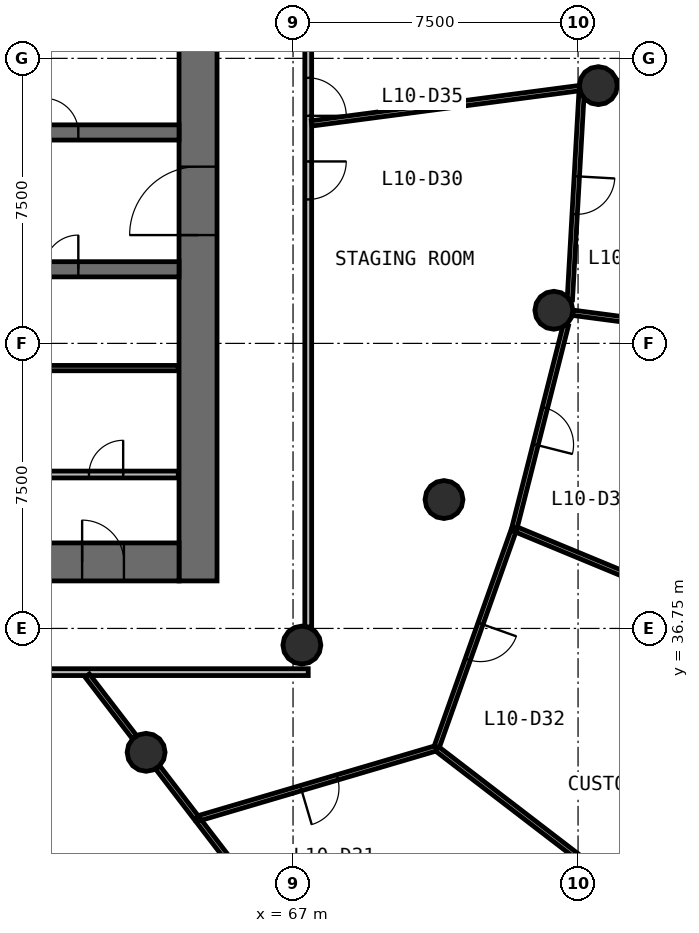
"""IFC4 building model, lengths in metres.
Left out: names, types, materials, properties, quantities, classifications, styles, units other than length and angle.
Written with IfcOpenShell. Run it as: python <this file> out.ifc"""

import sys

from ifc_helpers import new_model, si_unit, direction, frame, frame_2d, origin, origin_2d, place, context, subcontext, project, spatial, rectangle, circle, extrude, source, transform, mapped, element, fill, save


model = new_model("IFC4")
c1 = context("Model", 3, precision=1e-05, world=origin(), true_north=direction((0.0, 1.0)))
c2 = subcontext(c1, "Body", "Model", "MODEL_VIEW")
j1 = project(units=[si_unit("LENGTHUNIT", "METRE"), si_unit("PLANEANGLEUNIT", "RADIAN")], contexts=[c1])
p1 = place(None, origin())
s1 = spatial("IfcSite", under=j1, at=p1, CompositionType="ELEMENT")
p2 = place(p1, origin())
s2 = spatial("IfcBuilding", under=s1, at=p2, CompositionType="ELEMENT")
p3 = place(p2, frame((0.0, 0.0, 44.6)))
s3 = spatial("IfcBuildingStorey", under=s2, at=p3, CompositionType="ELEMENT", Elevation=44.6)
p4 = place(p3, frame((64.5, 38.0, 0.0), z_axis=(0.0, 0.0, 1.0), x_axis=(0.0, 1.0, 0.0)))
e1 = element("IfcWall", 1, at=p4, inside=s3, PredefinedType="SHEAR", context=c2, shape_type="SweptSolid", body=[
    extrude(rectangle(XDim=20.0, YDim=1.0, at=frame_2d((10.0, 0.0))), origin(), (0.0, 0.0, 1.0), 4.4),
])
p5 = place(p4, frame((9.1, 0.0, 0.0)))
e2 = element("IfcOpeningElement", 2, at=p5, cuts=e1, PredefinedType="OPENING", context=c2, shape_type="SweptSolid", body=[
    extrude(rectangle(XDim=1.8, YDim=2.1, at=frame_2d((0.9, 1.05))), frame((0.0, 0.51, 0.0), z_axis=(0.0, -1.0, 0.0), x_axis=(1.0, 0.0, 0.0)), (0.0, 0.0, 1.0), 1.02),
])
p6 = place(p3, frame((40.0, 38.5, 0.0), z_axis=(0.0, 0.0, 1.0), x_axis=(1.0, 0.0, 0.0)))
e3 = element("IfcWall", 3, at=p6, inside=s3, PredefinedType="SHEAR", context=c2, shape_type="SweptSolid", body=[
    extrude(rectangle(XDim=24.0, YDim=1.0, at=frame_2d((12.0, 0.0))), origin(), (0.0, 0.0, 1.0), 4.4),
])
p7 = place(p6, frame((21.45, 0.0, 0.0)))
e4 = element("IfcOpeningElement", 4, at=p7, cuts=e3, PredefinedType="OPENING", context=c2, shape_type="SweptSolid", body=[
    extrude(rectangle(XDim=1.1, YDim=2.1, at=frame_2d((0.55, 1.05))), frame((0.0, 0.51, 0.0), z_axis=(0.0, -1.0, 0.0), x_axis=(1.0, 0.0, 0.0)), (0.0, 0.0, 1.0), 1.02),
])
p8 = place(p6, frame((1.95, 0.0, 0.0)))
e5 = element("IfcOpeningElement", 5, at=p8, cuts=e3, PredefinedType="OPENING", context=c2, shape_type="SweptSolid", body=[
    extrude(rectangle(XDim=1.1, YDim=2.1, at=frame_2d((0.55, 1.05))), frame((0.0, 0.51, 0.0), z_axis=(0.0, -1.0, 0.0), x_axis=(1.0, 0.0, 0.0)), (0.0, 0.0, 1.0), 1.02),
])
p9 = place(p3, frame((40.0, 49.8, 0.0), z_axis=(0.0, 0.0, 1.0), x_axis=(1.0, 0.0, 0.0)))
e6 = element("IfcWall", 6, at=p9, inside=s3, PredefinedType="SHEAR", context=c2, shape_type="SweptSolid", body=[
    extrude(rectangle(XDim=24.0, YDim=0.4, at=frame_2d((12.0, 0.0))), origin(), (0.0, 0.0, 1.0), 4.4),
])
p10 = place(p9, frame((4.5, 0.0, 0.0)))
e7 = element("IfcOpeningElement", 7, at=p10, cuts=e6, PredefinedType="OPENING", context=c2, shape_type="SweptSolid", body=[
    extrude(rectangle(XDim=1.1, YDim=2.1, at=frame_2d((0.55, 1.05))), frame((0.0, 0.21, 0.0), z_axis=(0.0, -1.0, 0.0), x_axis=(1.0, 0.0, 0.0)), (0.0, 0.0, 1.0), 0.42),
])
p11 = place(p9, frame((7.0, 0.0, 0.0)))
e8 = element("IfcOpeningElement", 8, at=p11, cuts=e6, PredefinedType="OPENING", context=c2, shape_type="SweptSolid", body=[
    extrude(rectangle(XDim=1.1, YDim=2.1, at=frame_2d((0.55, 1.05))), frame((0.0, 0.21, 0.0), z_axis=(0.0, -1.0, 0.0), x_axis=(1.0, 0.0, 0.0)), (0.0, 0.0, 1.0), 0.42),
])
p12 = place(p9, frame((9.5, 0.0, 0.0)))
e9 = element("IfcOpeningElement", 9, at=p12, cuts=e6, PredefinedType="OPENING", context=c2, shape_type="SweptSolid", body=[
    extrude(rectangle(XDim=1.1, YDim=2.1, at=frame_2d((0.55, 1.05))), frame((0.0, 0.21, 0.0), z_axis=(0.0, -1.0, 0.0), x_axis=(1.0, 0.0, 0.0)), (0.0, 0.0, 1.0), 0.42),
])
p13 = place(p9, frame((0.9, 0.0, 0.0)))
e10 = element("IfcOpeningElement", 10, at=p13, cuts=e6, PredefinedType="OPENING", context=c2, shape_type="SweptSolid", body=[
    extrude(rectangle(XDim=1.8, YDim=2.4, at=frame_2d((0.9, 1.2))), frame((0.0, 0.21, 0.0), z_axis=(0.0, -1.0, 0.0), x_axis=(1.0, 0.0, 0.0)), (0.0, 0.0, 1.0), 0.42),
])
p14 = place(p9, frame((20.45, 0.0, 0.0)))
e11 = element("IfcOpeningElement", 11, at=p14, cuts=e6, PredefinedType="OPENING", context=c2, shape_type="SweptSolid", body=[
    extrude(rectangle(XDim=0.9, YDim=2.1, at=frame_2d((0.45, 1.05))), frame((0.0, 0.21, 0.0), z_axis=(0.0, -1.0, 0.0), x_axis=(1.0, 0.0, 0.0)), (0.0, 0.0, 1.0), 0.42),
])
p15 = place(p9, frame((11.65, 0.0, 0.0)))
e12 = element("IfcOpeningElement", 12, at=p15, cuts=e6, PredefinedType="OPENING", context=c2, shape_type="SweptSolid", body=[
    extrude(rectangle(XDim=0.9, YDim=2.1, at=frame_2d((0.45, 1.05))), frame((0.0, 0.21, 0.0), z_axis=(0.0, -1.0, 0.0), x_axis=(1.0, 0.0, 0.0)), (0.0, 0.0, 1.0), 0.42),
])
p16 = place(p3, frame((40.0, 46.2, 0.0), z_axis=(0.0, 0.0, 1.0), x_axis=(1.0, 0.0, 0.0)))
e13 = element("IfcWall", 13, at=p16, inside=s3, PredefinedType="SHEAR", context=c2, shape_type="SweptSolid", body=[
    extrude(rectangle(XDim=24.0, YDim=0.4, at=frame_2d((12.0, 0.0))), origin(), (0.0, 0.0, 1.0), 4.4),
])
p17 = place(p16, frame((4.5, 0.0, 0.0)))
e14 = element("IfcOpeningElement", 14, at=p17, cuts=e13, PredefinedType="OPENING", context=c2, shape_type="SweptSolid", body=[
    extrude(rectangle(XDim=1.1, YDim=2.1, at=frame_2d((0.55, 1.05))), frame((0.0, 0.21, 0.0), z_axis=(0.0, -1.0, 0.0), x_axis=(1.0, 0.0, 0.0)), (0.0, 0.0, 1.0), 0.42),
])
p18 = place(p16, frame((7.0, 0.0, 0.0)))
e15 = element("IfcOpeningElement", 15, at=p18, cuts=e13, PredefinedType="OPENING", context=c2, shape_type="SweptSolid", body=[
    extrude(rectangle(XDim=1.1, YDim=2.1, at=frame_2d((0.55, 1.05))), frame((0.0, 0.21, 0.0), z_axis=(0.0, -1.0, 0.0), x_axis=(1.0, 0.0, 0.0)), (0.0, 0.0, 1.0), 0.42),
])
p19 = place(p16, frame((9.5, 0.0, 0.0)))
e16 = element("IfcOpeningElement", 16, at=p19, cuts=e13, PredefinedType="OPENING", context=c2, shape_type="SweptSolid", body=[
    extrude(rectangle(XDim=1.1, YDim=2.1, at=frame_2d((0.55, 1.05))), frame((0.0, 0.21, 0.0), z_axis=(0.0, -1.0, 0.0), x_axis=(1.0, 0.0, 0.0)), (0.0, 0.0, 1.0), 0.42),
])
p20 = place(p16, frame((20.45, 0.0, 0.0)))
e17 = element("IfcOpeningElement", 17, at=p20, cuts=e13, PredefinedType="OPENING", context=c2, shape_type="SweptSolid", body=[
    extrude(rectangle(XDim=0.9, YDim=2.1, at=frame_2d((0.45, 1.05))), frame((0.0, 0.21, 0.0), z_axis=(0.0, -1.0, 0.0), x_axis=(1.0, 0.0, 0.0)), (0.0, 0.0, 1.0), 0.42),
])
p21 = place(p16, frame((2.65, 0.0, 0.0)))
e18 = element("IfcOpeningElement", 18, at=p21, cuts=e13, PredefinedType="OPENING", context=c2, shape_type="SweptSolid", body=[
    extrude(rectangle(XDim=0.9, YDim=2.1, at=frame_2d((0.45, 1.05))), frame((0.0, 0.21, 0.0), z_axis=(0.0, -1.0, 0.0), x_axis=(1.0, 0.0, 0.0)), (0.0, 0.0, 1.0), 0.42),
])
p22 = place(p16, frame((11.65, 0.0, 0.0)))
e19 = element("IfcOpeningElement", 19, at=p22, cuts=e13, PredefinedType="OPENING", context=c2, shape_type="SweptSolid", body=[
    extrude(rectangle(XDim=0.9, YDim=2.1, at=frame_2d((0.45, 1.05))), frame((0.0, 0.21, 0.0), z_axis=(0.0, -1.0, 0.0), x_axis=(1.0, 0.0, 0.0)), (0.0, 0.0, 1.0), 0.42),
])
m1 = source(origin(), c2, "Body", "SweptSolid", [
    extrude(circle(Radius=0.5, at=origin_2d()), origin(), (0.0, 0.0, 1.0), 4.4),
])
for number, where, z_axis, x_axis in (
    (20, (75.034, 51.032, 0.0), (0.0, 0.0, 1.0), (1.0, 0.0, 0.0)),
    (21, (63.134, 33.49, 0.0), (0.0, 0.0, 1.0), (1.0, 0.0, 0.0)),
    (22, (67.232, 36.312, 0.0), (0.0, 0.0, 1.0), (1.0, 0.0, 0.0)),
    (23, (70.972, 40.141, 0.0), (0.0, 0.0, 1.0), (1.0, 0.0, 0.0)),
    (24, (73.863, 45.122, 0.0), (0.0, 0.0, 1.0), (1.0, 0.0, 0.0)),
):
    element("IfcColumn", number, at=place(p3, frame(where, z_axis=z_axis, x_axis=x_axis)), inside=s3, PredefinedType="COLUMN", context=c2, shape_type="MappedRepresentation", body=[
        mapped(m1, transform((0.0, 0.0, 0.0), scale=1.0)),
    ])
p23 = place(p3, frame((67.4, 35.6, 0.0), z_axis=(0.0, 0.0, 1.0), x_axis=(-1.0, 0.0, 0.0)))
e25 = element("IfcWall", 25, at=p23, inside=s3, PredefinedType="PARTITIONING", context=c2, shape_type="SweptSolid", body=[
    extrude(rectangle(XDim=30.8, YDim=0.18, at=frame_2d((15.4, 0.0))), origin(), (0.0, 0.0, 1.0), 3.05),
])
p24 = place(p23, frame((27.45, 0.0, 0.0)))
e26 = element("IfcOpeningElement", 26, at=p24, cuts=e25, PredefinedType="OPENING", context=c2, shape_type="SweptSolid", body=[
    extrude(rectangle(XDim=0.9, YDim=2.1, at=frame_2d((0.45, 1.05))), frame((0.0, 0.1, 0.0), z_axis=(0.0, -1.0, 0.0), x_axis=(1.0, 0.0, 0.0)), (0.0, 0.0, 1.0), 0.2),
])
p25 = place(p23, frame((23.85, 0.0, 0.0)))
e27 = element("IfcOpeningElement", 27, at=p25, cuts=e25, PredefinedType="OPENING", context=c2, shape_type="SweptSolid", body=[
    extrude(rectangle(XDim=0.9, YDim=2.1, at=frame_2d((0.45, 1.05))), frame((0.0, 0.1, 0.0), z_axis=(0.0, -1.0, 0.0), x_axis=(1.0, 0.0, 0.0)), (0.0, 0.0, 1.0), 0.2),
])
p26 = place(p23, frame((20.85, 0.0, 0.0)))
e28 = element("IfcOpeningElement", 28, at=p26, cuts=e25, PredefinedType="OPENING", context=c2, shape_type="SweptSolid", body=[
    extrude(rectangle(XDim=0.9, YDim=2.1, at=frame_2d((0.45, 1.05))), frame((0.0, 0.1, 0.0), z_axis=(0.0, -1.0, 0.0), x_axis=(1.0, 0.0, 0.0)), (0.0, 0.0, 1.0), 0.2),
])
p27 = place(p23, frame((14.95, 0.0, 0.0)))
e29 = element("IfcOpeningElement", 29, at=p27, cuts=e25, PredefinedType="OPENING", context=c2, shape_type="SweptSolid", body=[
    extrude(rectangle(XDim=1.0, YDim=2.1, at=frame_2d((0.5, 1.05))), frame((0.0, 0.1, 0.0), z_axis=(0.0, -1.0, 0.0), x_axis=(1.0, 0.0, 0.0)), (0.0, 0.0, 1.0), 0.2),
])
p28 = place(p3, frame((67.4, 60.37, 0.0), z_axis=(0.0, 0.0, 1.0), x_axis=(0.0, -1.0, 0.0)))
e30 = element("IfcWall", 30, at=p28, inside=s3, PredefinedType="PARTITIONING", context=c2, shape_type="SweptSolid", body=[
    extrude(rectangle(XDim=23.583, YDim=0.18, at=frame_2d((11.791, 0.0))), origin(), (0.0, 0.0, 1.0), 3.05),
])
p29 = place(p28, frame((11.333, 0.0, 0.0)))
e31 = element("IfcOpeningElement", 31, at=p29, cuts=e30, PredefinedType="OPENING", context=c2, shape_type="SweptSolid", body=[
    extrude(rectangle(XDim=1.0, YDim=2.1, at=frame_2d((0.5, 1.05))), frame((0.0, 0.1, 0.0), z_axis=(0.0, -1.0, 0.0), x_axis=(1.0, 0.0, 0.0)), (0.0, 0.0, 1.0), 0.2),
])
p30 = place(p28, frame((9.133, 0.0, 0.0)))
e32 = element("IfcOpeningElement", 32, at=p30, cuts=e30, PredefinedType="OPENING", context=c2, shape_type="SweptSolid", body=[
    extrude(rectangle(XDim=1.0, YDim=2.1, at=frame_2d((0.5, 1.05))), frame((0.0, 0.1, 0.0), z_axis=(0.0, -1.0, 0.0), x_axis=(1.0, 0.0, 0.0)), (0.0, 0.0, 1.0), 0.2),
])
p31 = place(p3, frame((60.23, 40.8, 0.0), z_axis=(0.0, 0.0, 1.0), x_axis=(1.0, 0.0, 0.0)))
e33 = element("IfcWall", 33, at=p31, inside=s3, PredefinedType="PARTITIONING", context=c2, shape_type="SweptSolid", body=[
    extrude(rectangle(XDim=3.75, YDim=0.18, at=frame_2d((1.875, 0.0))), origin(), (0.0, 0.0, 1.0), 3.95),
])
p32 = place(p31, frame((1.4, 0.0, 0.0)))
e34 = element("IfcOpeningElement", 34, at=p32, cuts=e33, PredefinedType="OPENING", context=c2, shape_type="SweptSolid", body=[
    extrude(rectangle(XDim=0.9, YDim=2.1, at=frame_2d((0.45, 1.05))), frame((0.0, 0.1, 0.0), z_axis=(0.0, -1.0, 0.0), x_axis=(1.0, 0.0, 0.0)), (0.0, 0.0, 1.0), 0.2),
])
p33 = place(p3, frame((75.534, 51.098, 0.0), z_axis=(0.0, 0.0, 1.0), x_axis=(0.991446586451, 0.130513088287, 0.0)))
e35 = element("IfcWall", 35, at=p33, inside=s3, PredefinedType="PARTITIONING", context=c2, shape_type="SweptSolid", body=[
    extrude(rectangle(XDim=11.86, YDim=0.14, at=frame_2d((5.93, 0.0))), origin(), (0.0, 0.0, 1.0), 3.05),
])
p34 = place(p3, frame((74.363, 45.056, 0.0), z_axis=(0.0, 0.0, 1.0), x_axis=(0.991443306772, -0.130538000051, 0.0)))
e36 = element("IfcWall", 36, at=p34, inside=s3, PredefinedType="PARTITIONING", context=c2, shape_type="SweptSolid", body=[
    extrude(rectangle(XDim=11.195, YDim=0.14, at=frame_2d((5.598, 0.0))), origin(), (0.0, 0.0, 1.0), 3.05),
])
p35 = place(p3, frame((72.821, 39.375, 0.0), z_axis=(0.0, 0.0, 1.0), x_axis=(0.923875203153, -0.382693884193, 0.0)))
e37 = element("IfcWall", 37, at=p35, inside=s3, PredefinedType="PARTITIONING", context=c2, shape_type="SweptSolid", body=[
    extrude(rectangle(XDim=8.845, YDim=0.14, at=frame_2d((4.423, 0.0))), origin(), (0.0, 0.0, 1.0), 3.05),
])
p36 = place(p3, frame((67.49, 50.039, 0.0), z_axis=(0.0, 0.0, 1.0), x_axis=(0.99144622305, 0.130515848849, 0.0)))
e38 = element("IfcWall", 38, at=p36, inside=s3, PredefinedType="PARTITIONING", context=c2, shape_type="SweptSolid", body=[
    extrude(rectangle(XDim=7.104, YDim=0.14, at=frame_2d((3.552, 0.0))), origin(), (0.0, 0.0, 1.0), 3.05),
])
p37 = place(p3, frame((70.769, 33.598, 0.0), z_axis=(0.0, 0.0, 1.0), x_axis=(-0.959164410747, -0.282849134974, 0.0)))
e39 = element("IfcWall", 39, at=p37, inside=s3, PredefinedType="PARTITIONING", context=c2, shape_type="SweptSolid", body=[
    extrude(rectangle(XDim=6.562, YDim=0.14, at=frame_2d((3.281, 0.0))), origin(), (0.0, 0.0, 1.0), 3.05),
])
p38 = place(p37, frame((2.712, 0.0, 0.0)))
e40 = element("IfcOpeningElement", 40, at=p38, cuts=e39, PredefinedType="OPENING", context=c2, shape_type="SweptSolid", body=[
    extrude(rectangle(XDim=1.0, YDim=2.1, at=frame_2d((0.5, 1.05))), frame((0.0, 0.08, 0.0), z_axis=(0.0, -1.0, 0.0), x_axis=(1.0, 0.0, 0.0)), (0.0, 0.0, 1.0), 0.16),
])
p39 = place(p3, frame((72.798, 39.309, 0.0), z_axis=(0.0, 0.0, 1.0), x_axis=(-0.334820387554, -0.942281968456, 0.0)))
e41 = element("IfcWall", 41, at=p39, inside=s3, PredefinedType="PARTITIONING", context=c2, shape_type="SweptSolid", body=[
    extrude(rectangle(XDim=6.031, YDim=0.14, at=frame_2d((3.016, 0.0))), origin(), (0.0, 0.0, 1.0), 3.05),
])
p40 = place(p39, frame((2.581, 0.0, 0.0)))
e42 = element("IfcOpeningElement", 42, at=p40, cuts=e41, PredefinedType="OPENING", context=c2, shape_type="SweptSolid", body=[
    extrude(rectangle(XDim=1.0, YDim=2.1, at=frame_2d((0.5, 1.05))), frame((0.0, 0.08, 0.0), z_axis=(0.0, -1.0, 0.0), x_axis=(1.0, 0.0, 0.0)), (0.0, 0.0, 1.0), 0.16),
])
p41 = place(p3, frame((70.793, 33.58, 0.0), z_axis=(0.0, 0.0, 1.0), x_axis=(0.793369467151, -0.6087404115, 0.0)))
e43 = element("IfcWall", 43, at=p41, inside=s3, PredefinedType="PARTITIONING", context=c2, shape_type="SweptSolid", body=[
    extrude(rectangle(XDim=5.608, YDim=0.14, at=frame_2d((2.804, 0.0))), origin(), (0.0, 0.0, 1.0), 3.05),
])
p42 = place(p3, frame((74.178, 44.727, 0.0), z_axis=(0.0, 0.0, 1.0), x_axis=(-0.245735490717, -0.969336922129, 0.0)))
e44 = element("IfcWall", 44, at=p42, inside=s3, PredefinedType="PARTITIONING", context=c2, shape_type="SweptSolid", body=[
    extrude(rectangle(XDim=5.491, YDim=0.14, at=frame_2d((2.746, 0.0))), origin(), (0.0, 0.0, 1.0), 3.05),
])
p43 = place(p42, frame((2.241, 0.0, 0.0)))
e45 = element("IfcOpeningElement", 45, at=p43, cuts=e44, PredefinedType="OPENING", context=c2, shape_type="SweptSolid", body=[
    extrude(rectangle(XDim=1.0, YDim=2.1, at=frame_2d((0.5, 1.05))), frame((0.0, 0.08, 0.0), z_axis=(0.0, -1.0, 0.0), x_axis=(1.0, 0.0, 0.0)), (0.0, 0.0, 1.0), 0.16),
])
p44 = place(p3, frame((74.589, 50.793, 0.0), z_axis=(0.0, 0.0, 1.0), x_axis=(-0.056551571082, -0.998399679391, 0.0)))
e46 = element("IfcWall", 46, at=p44, inside=s3, PredefinedType="PARTITIONING", context=c2, shape_type="SweptSolid", body=[
    extrude(rectangle(XDim=5.401, YDim=0.14, at=frame_2d((2.7, 0.0))), origin(), (0.0, 0.0, 1.0), 3.05),
])
p45 = place(p44, frame((2.151, 0.0, 0.0)))
e47 = element("IfcOpeningElement", 47, at=p45, cuts=e46, PredefinedType="OPENING", context=c2, shape_type="SweptSolid", body=[
    extrude(rectangle(XDim=1.0, YDim=2.1, at=frame_2d((0.5, 1.05))), frame((0.0, 0.08, 0.0), z_axis=(0.0, -1.0, 0.0), x_axis=(1.0, 0.0, 0.0)), (0.0, 0.0, 1.0), 0.16),
])
p46 = place(p3, frame((60.23, 43.6, 0.0), z_axis=(0.0, 0.0, 1.0), x_axis=(1.0, 0.0, 0.0)))
e48 = element("IfcWall", 48, at=p46, inside=s3, PredefinedType="PARTITIONING", context=c2, shape_type="SweptSolid", body=[
    extrude(rectangle(XDim=3.75, YDim=0.14, at=frame_2d((1.875, 0.0))), origin(), (0.0, 0.0, 1.0), 3.05),
])
p47 = place(p3, frame((64.521, 31.683, 0.0), z_axis=(0.0, 0.0, 1.0), x_axis=(0.608761578312, -0.793353225727, 0.0)))
e49 = element("IfcWall", 49, at=p47, inside=s3, PredefinedType="PARTITIONING", context=c2, shape_type="SweptSolid", body=[
    extrude(rectangle(XDim=2.748, YDim=0.14, at=frame_2d((1.374, 0.0))), origin(), (0.0, 0.0, 1.0), 3.05),
])
p48 = place(p3, frame((61.584, 35.51, 0.0), z_axis=(0.0, 0.0, 1.0), x_axis=(0.608727763541, -0.793379171578, 0.0)))
e50 = element("IfcWall", 50, at=p48, inside=s3, PredefinedType="PARTITIONING", context=c2, shape_type="SweptSolid", body=[
    extrude(rectangle(XDim=2.042, YDim=0.14, at=frame_2d((1.021, 0.0))), origin(), (0.0, 0.0, 1.0), 3.05),
])
p49 = place(p3, frame((63.441, 33.09, 0.0), z_axis=(0.0, 0.0, 1.0), x_axis=(0.608812360851, -0.793314256317, 0.0)))
e51 = element("IfcWall", 51, at=p49, inside=s3, PredefinedType="PARTITIONING", context=c2, shape_type="SweptSolid", body=[
    extrude(rectangle(XDim=1.669, YDim=0.14, at=frame_2d((0.834, 0.0))), origin(), (0.0, 0.0, 1.0), 3.05),
])
m2 = source(origin(), c2, "Body", "SweptSolid", [
    extrude(rectangle(XDim=1.8, YDim=2.1, at=frame_2d((0.9, 1.05))), frame((0.0, 0.025, 0.0), z_axis=(0.0, -1.0, 0.0), x_axis=(1.0, 0.0, 0.0)), (0.0, 0.0, 1.0), 0.05),
])
p50 = place(p5, origin())
e52 = element("IfcDoor", 52, at=p50, inside=s3, OperationType="SINGLE_SWING_LEFT", PredefinedType="DOOR", context=c2, shape_type="MappedRepresentation", body=[
    mapped(m2, transform((0.0, 0.0, 0.0), scale=1.0)),
])
fill(e2, e52)
m3 = source(origin(), c2, "Body", "SweptSolid", [
    extrude(rectangle(XDim=1.1, YDim=2.1, at=frame_2d((0.55, 1.05))), frame((0.0, 0.025, 0.0), z_axis=(0.0, -1.0, 0.0), x_axis=(1.0, 0.0, 0.0)), (0.0, 0.0, 1.0), 0.05),
])
p51 = place(p7, origin())
e53 = element("IfcDoor", 53, at=p51, inside=s3, OperationType="SINGLE_SWING_LEFT", PredefinedType="DOOR", context=c2, shape_type="MappedRepresentation", body=[
    mapped(m3, transform((0.0, 0.0, 0.0), scale=1.0)),
])
fill(e4, e53)
m4 = source(origin(), c2, "Body", "SweptSolid", [
    extrude(rectangle(XDim=1.0, YDim=2.1, at=frame_2d((0.5, 1.05))), frame((0.0, 0.025, 0.0), z_axis=(0.0, -1.0, 0.0), x_axis=(1.0, 0.0, 0.0)), (0.0, 0.0, 1.0), 0.05),
])
p52 = place(p29, origin())
e54 = element("IfcDoor", 54, at=p52, inside=s3, OperationType="SINGLE_SWING_LEFT", PredefinedType="DOOR", context=c2, shape_type="MappedRepresentation", body=[
    mapped(m4, transform((0.0, 0.0, 0.0), scale=1.0)),
])
fill(e31, e54)
p53 = place(p38, origin())
e55 = element("IfcDoor", 55, at=p53, inside=s3, OperationType="SINGLE_SWING_RIGHT", PredefinedType="DOOR", context=c2, shape_type="MappedRepresentation", body=[
    mapped(m4, transform((0.0, 0.0, 0.0), scale=1.0)),
])
fill(e40, e55)
p54 = place(p40, origin())
e56 = element("IfcDoor", 56, at=p54, inside=s3, OperationType="SINGLE_SWING_LEFT", PredefinedType="DOOR", context=c2, shape_type="MappedRepresentation", body=[
    mapped(m4, transform((0.0, 0.0, 0.0), scale=1.0)),
])
fill(e42, e56)
p55 = place(p43, origin())
e57 = element("IfcDoor", 57, at=p55, inside=s3, OperationType="SINGLE_SWING_RIGHT", PredefinedType="DOOR", context=c2, shape_type="MappedRepresentation", body=[
    mapped(m4, transform((0.0, 0.0, 0.0), scale=1.0)),
])
fill(e45, e57)
p56 = place(p45, origin())
e58 = element("IfcDoor", 58, at=p56, inside=s3, OperationType="SINGLE_SWING_LEFT", PredefinedType="DOOR", context=c2, shape_type="MappedRepresentation", body=[
    mapped(m4, transform((0.0, 0.0, 0.0), scale=1.0)),
])
fill(e47, e58)
p57 = place(p30, origin())
e59 = element("IfcDoor", 59, at=p57, inside=s3, OperationType="SINGLE_SWING_RIGHT", PredefinedType="DOOR", context=c2, shape_type="MappedRepresentation", body=[
    mapped(m4, transform((0.0, 0.0, 0.0), scale=1.0)),
])
fill(e32, e59)
m5 = source(origin(), c2, "Body", "SweptSolid", [
    extrude(rectangle(XDim=0.9, YDim=2.1, at=frame_2d((0.45, 1.05))), frame((0.0, 0.025, 0.0), z_axis=(0.0, -1.0, 0.0), x_axis=(1.0, 0.0, 0.0)), (0.0, 0.0, 1.0), 0.05),
])
p58 = place(p20, origin())
e60 = element("IfcDoor", 60, at=p58, inside=s3, OperationType="SINGLE_SWING_RIGHT", PredefinedType="DOOR", context=c2, shape_type="MappedRepresentation", body=[
    mapped(m5, transform((0.0, 0.0, 0.0), scale=1.0)),
])
fill(e17, e60)
p59 = place(p14, origin())
e61 = element("IfcDoor", 61, at=p59, inside=s3, OperationType="SINGLE_SWING_LEFT", PredefinedType="DOOR", context=c2, shape_type="MappedRepresentation", body=[
    mapped(m5, transform((0.0, 0.0, 0.0), scale=1.0)),
])
fill(e11, e61)
p60 = place(p32, origin())
e62 = element("IfcDoor", 62, at=p60, inside=s3, OperationType="SINGLE_SWING_RIGHT", PredefinedType="DOOR", context=c2, shape_type="MappedRepresentation", body=[
    mapped(m5, transform((0.0, 0.0, 0.0), scale=1.0)),
])
fill(e34, e62)
save(model, sys.argv[1])
